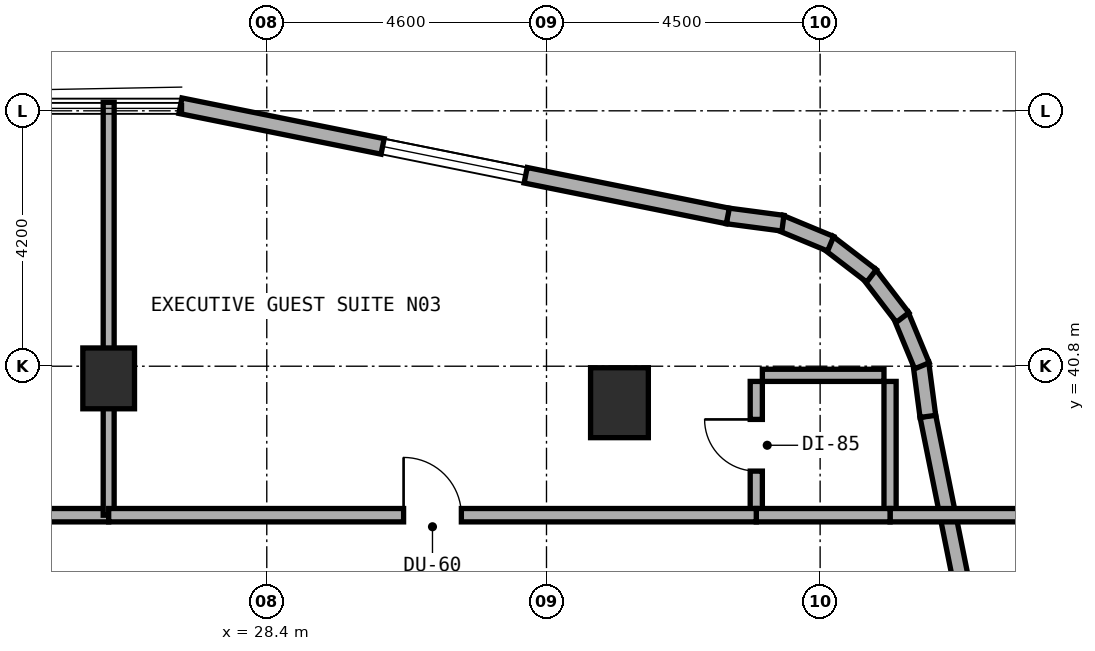
"""IFC4 building model, lengths in metres.
Left out: names, types, materials, properties, quantities, classifications, styles, units other than length and angle.
Written with IfcOpenShell. Run it as: python <this file> out.ifc"""

import sys

from ifc_helpers import new_model, si_unit, direction, frame, frame_2d, origin, origin_2d, place, context, subcontext, project, spatial, rectangle, extrude, element, fill, save


model = new_model("IFC4")
c1 = context("Model", 3, precision=1e-05, world=origin(), true_north=direction((0.0, 1.0)))
c2 = subcontext(c1, "Body", "Model", "MODEL_VIEW")
j1 = project(units=[si_unit("LENGTHUNIT", "METRE"), si_unit("PLANEANGLEUNIT", "RADIAN")], contexts=[c1])
p1 = place(None, origin())
s1 = spatial("IfcSite", under=j1, at=p1, CompositionType="ELEMENT")
p2 = place(p1, origin())
s2 = spatial("IfcBuilding", under=s1, at=p2, CompositionType="ELEMENT")
p3 = place(p2, frame((0.0, 0.0, 109.0)))
s3 = spatial("IfcBuildingStorey", under=s2, at=p3, CompositionType="ELEMENT", Elevation=109.0)
p4 = place(p3, frame((25.8, 40.6, 0.0), z_axis=(0.0, 0.0, 1.0), x_axis=(1.0, 0.0, 0.0)))
e1 = element("IfcColumn", 1, at=p4, inside=s3, PredefinedType="COLUMN", context=c2, shape_type="SweptSolid", body=[
    extrude(rectangle(XDim=0.85, YDim=1.0, at=origin_2d()), origin(), (0.0, 0.0, 1.0), 3.5),
])
p5 = place(p3, frame((34.2, 40.2, 0.0), z_axis=(0.0, 0.0, 1.0), x_axis=(1.0, 0.0, 0.0)))
e2 = element("IfcColumn", 2, at=p5, inside=s3, PredefinedType="COLUMN", context=c2, shape_type="SweptSolid", body=[
    extrude(rectangle(XDim=0.95, YDim=1.15, at=origin_2d()), origin(), (0.0, 0.0, 1.0), 3.5),
])
p6 = place(p3, frame((41.084, 30.98, 0.0), z_axis=(0.0, 0.0, 1.0), x_axis=(-0.197435082048, 0.980315963543, 0.0)))
e3 = element("IfcWall", 3, at=p6, inside=s3, PredefinedType="STANDARD", context=c2, shape_type="SweptSolid", body=[
    extrude(rectangle(XDim=9.183, YDim=0.26, at=frame_2d((4.591, 0.0))), origin(), (0.0, 0.0, 1.0), 3.22),
])
p7 = place(p6, frame((2.497, 0.0, 0.8)))
e4 = element("IfcOpeningElement", 4, at=p7, cuts=e3, PredefinedType="OPENING", context=c2, shape_type="SweptSolid", body=[
    extrude(rectangle(XDim=2.4, YDim=1.6, at=frame_2d((1.2, 0.8))), frame((0.0, 0.14, 0.0), z_axis=(0.0, -1.0, 0.0), x_axis=(1.0, 0.0, 0.0)), (0.0, 0.0, 1.0), 0.28),
])
p8 = place(p3, frame((39.272, 39.975, 0.0), z_axis=(0.0, 0.0, 1.0), x_axis=(-0.130953706898, 0.991388484223, 0.0)))
e5 = element("IfcWall", 5, at=p8, inside=s3, PredefinedType="STANDARD", context=c2, shape_type="SweptSolid", body=[
    extrude(rectangle(XDim=0.885, YDim=0.26, at=frame_2d((0.443, 0.0))), origin(), (0.0, 0.0, 1.0), 3.22),
])
p9 = place(p3, frame((39.174, 40.807, 0.0), z_axis=(0.0, 0.0, 1.0), x_axis=(-0.383290660547, 0.923627776508, 0.0)))
e6 = element("IfcWall", 6, at=p9, inside=s3, PredefinedType="STANDARD", context=c2, shape_type="SweptSolid", body=[
    extrude(rectangle(XDim=0.903, YDim=0.26, at=frame_2d((0.452, 0.0))), origin(), (0.0, 0.0, 1.0), 3.22),
])
p10 = place(p3, frame((38.856, 41.601, 0.0), z_axis=(0.0, 0.0, 1.0), x_axis=(-0.608624690463, 0.793458244748, 0.0)))
e7 = element("IfcWall", 7, at=p10, inside=s3, PredefinedType="STANDARD", context=c2, shape_type="SweptSolid", body=[
    extrude(rectangle(XDim=0.902, YDim=0.26, at=frame_2d((0.451, 0.0))), origin(), (0.0, 0.0, 1.0), 3.22),
])
p11 = place(p3, frame((38.345, 42.286, 0.0), z_axis=(0.0, 0.0, 1.0), x_axis=(-0.793558456666, 0.608494022858, 0.0)))
e8 = element("IfcWall", 8, at=p11, inside=s3, PredefinedType="STANDARD", context=c2, shape_type="SweptSolid", body=[
    extrude(rectangle(XDim=0.902, YDim=0.26, at=frame_2d((0.451, 0.0))), origin(), (0.0, 0.0, 1.0), 3.22),
])
p12 = place(p3, frame((37.673, 42.814, 0.0), z_axis=(0.0, 0.0, 1.0), x_axis=(-0.923683767999, 0.383155708213, 0.0)))
e9 = element("IfcWall", 9, at=p12, inside=s3, PredefinedType="STANDARD", context=c2, shape_type="SweptSolid", body=[
    extrude(rectangle(XDim=0.903, YDim=0.26, at=frame_2d((0.451, 0.0))), origin(), (0.0, 0.0, 1.0), 3.22),
])
p13 = place(p3, frame((36.888, 43.152, 0.0), z_axis=(0.0, 0.0, 1.0), x_axis=(-0.991487658083, 0.130200706103, 0.0)))
e10 = element("IfcWall", 10, at=p13, inside=s3, PredefinedType="STANDARD", context=c2, shape_type="SweptSolid", body=[
    extrude(rectangle(XDim=0.921, YDim=0.26, at=frame_2d((0.46, 0.0))), origin(), (0.0, 0.0, 1.0), 3.22),
])
p14 = place(p3, frame((35.982, 43.271, 0.0), z_axis=(0.0, 0.0, 1.0), x_axis=(-0.980315963543, 0.197435082048, 0.0)))
e11 = element("IfcWall", 11, at=p14, inside=s3, PredefinedType="STANDARD", context=c2, shape_type="SweptSolid", body=[
    extrude(rectangle(XDim=9.183, YDim=0.26, at=frame_2d((4.591, 0.0))), origin(), (0.0, 0.0, 1.0), 3.22),
])
p15 = place(p14, frame((3.391, 0.0, 0.8)))
e12 = element("IfcOpeningElement", 12, at=p15, cuts=e11, PredefinedType="OPENING", context=c2, shape_type="SweptSolid", body=[
    extrude(rectangle(XDim=2.4, YDim=1.6, at=frame_2d((1.2, 0.8))), frame((0.0, 0.14, 0.0), z_axis=(0.0, -1.0, 0.0), x_axis=(1.0, 0.0, 0.0)), (0.0, 0.0, 1.0), 0.28),
])
p16 = place(p3, frame((18.4, 38.35, 0.0), z_axis=(0.0, 0.0, 1.0), x_axis=(1.0, 0.0, 0.0)))
e13 = element("IfcWall", 13, at=p16, inside=s3, PredefinedType="SOLIDWALL", context=c2, shape_type="SweptSolid", body=[
    extrude(rectangle(XDim=7.4, YDim=0.22, at=frame_2d((3.7, 0.0))), origin(), (0.0, 0.0, 1.0), 2.595),
])
p17 = place(p16, frame((3.225, 0.0, 0.0)))
e14 = element("IfcOpeningElement", 14, at=p17, cuts=e13, PredefinedType="OPENING", context=c2, shape_type="SweptSolid", body=[
    extrude(rectangle(XDim=0.95, YDim=2.1, at=frame_2d((0.475, 1.05))), frame((0.0, 0.12, 0.0), z_axis=(0.0, -1.0, 0.0), x_axis=(1.0, 0.0, 0.0)), (0.0, 0.0, 1.0), 0.24),
])
p18 = place(p3, frame((25.8, 38.35, 0.0), z_axis=(0.0, 0.0, 1.0), x_axis=(0.0, 1.0, 0.0)))
e15 = element("IfcWall", 15, at=p18, inside=s3, PredefinedType="SOLIDWALL", context=c2, shape_type="SweptSolid", body=[
    extrude(rectangle(XDim=6.79, YDim=0.18, at=frame_2d((3.395, 0.0))), origin(), (0.0, 0.0, 1.0), 2.595),
])
p19 = place(p3, frame((36.45, 38.45, 0.0), z_axis=(0.0, 0.0, 1.0), x_axis=(0.0, 1.0, 0.0)))
e16 = element("IfcWall", 16, at=p19, inside=s3, PredefinedType="PLUMBINGWALL", context=c2, shape_type="SweptSolid", body=[
    extrude(rectangle(XDim=2.1, YDim=0.2, at=frame_2d((1.05, 0.0))), origin(), (0.0, 0.0, 1.0), 3.22),
])
p20 = place(p19, frame((0.625, 0.0, 0.0)))
e17 = element("IfcOpeningElement", 17, at=p20, cuts=e16, PredefinedType="OPENING", context=c2, shape_type="SweptSolid", body=[
    extrude(rectangle(XDim=0.85, YDim=2.1, at=frame_2d((0.425, 1.05))), frame((0.0, 0.11, 0.0), z_axis=(0.0, -1.0, 0.0), x_axis=(1.0, 0.0, 0.0)), (0.0, 0.0, 1.0), 0.22),
])
p21 = place(p3, frame((36.55, 40.65, 0.0), z_axis=(0.0, 0.0, 1.0), x_axis=(1.0, 0.0, 0.0)))
e18 = element("IfcWall", 18, at=p21, inside=s3, PredefinedType="PLUMBINGWALL", context=c2, shape_type="SweptSolid", body=[
    extrude(rectangle(XDim=2.0, YDim=0.2, at=frame_2d((1.0, 0.0))), origin(), (0.0, 0.0, 1.0), 3.22),
])
p22 = place(p3, frame((38.65, 38.45, 0.0), z_axis=(0.0, 0.0, 1.0), x_axis=(0.0, 1.0, 0.0)))
e19 = element("IfcWall", 19, at=p22, inside=s3, PredefinedType="PLUMBINGWALL", context=c2, shape_type="SweptSolid", body=[
    extrude(rectangle(XDim=2.1, YDim=0.2, at=frame_2d((1.05, 0.0))), origin(), (0.0, 0.0, 1.0), 3.22),
])
p23 = place(p3, frame((38.65, 38.35, 0.0), z_axis=(0.0, 0.0, 1.0), x_axis=(1.0, 0.0, 0.0)))
e20 = element("IfcWall", 20, at=p23, inside=s3, PredefinedType="SOLIDWALL", context=c2, shape_type="SweptSolid", body=[
    extrude(rectangle(XDim=2.39, YDim=0.22, at=frame_2d((1.195, 0.0))), origin(), (0.0, 0.0, 1.0), 3.22),
])
p24 = place(p3, frame((36.45, 38.35, 0.0), z_axis=(0.0, 0.0, 1.0), x_axis=(1.0, 0.0, 0.0)))
e21 = element("IfcWall", 21, at=p24, inside=s3, PredefinedType="SOLIDWALL", context=c2, shape_type="SweptSolid", body=[
    extrude(rectangle(XDim=2.2, YDim=0.22, at=frame_2d((1.1, 0.0))), origin(), (0.0, 0.0, 1.0), 3.22),
])
p25 = place(p3, frame((25.8, 38.35, 0.0), z_axis=(0.0, 0.0, 1.0), x_axis=(1.0, 0.0, 0.0)))
e22 = element("IfcWall", 22, at=p25, inside=s3, PredefinedType="SOLIDWALL", context=c2, shape_type="SweptSolid", body=[
    extrude(rectangle(XDim=10.65, YDim=0.22, at=frame_2d((5.325, 0.0))), origin(), (0.0, 0.0, 1.0), 2.595),
])
p26 = place(p25, frame((4.85, 0.0, 0.0)))
e23 = element("IfcOpeningElement", 23, at=p26, cuts=e22, PredefinedType="OPENING", context=c2, shape_type="SweptSolid", body=[
    extrude(rectangle(XDim=0.95, YDim=2.1, at=frame_2d((0.475, 1.05))), frame((0.0, 0.12, 0.0), z_axis=(0.0, -1.0, 0.0), x_axis=(1.0, 0.0, 0.0)), (0.0, 0.0, 1.0), 0.24),
])
p27 = place(p15, origin())
e24 = element("IfcWindow", 24, at=p27, inside=s3, PartitioningType="SINGLE_PANEL", PredefinedType="WINDOW", context=c2, shape_type="SweptSolid", body=[
    extrude(rectangle(XDim=2.4, YDim=1.6, at=frame_2d((1.2, 0.8))), frame((0.0, 0.03, 0.0), z_axis=(0.0, -1.0, 0.0), x_axis=(1.0, 0.0, 0.0)), (0.0, 0.0, 1.0), 0.06),
])
fill(e12, e24)
p28 = place(p20, origin())
e25 = element("IfcDoor", 25, at=p28, inside=s3, OperationType="SINGLE_SWING_RIGHT", PredefinedType="DOOR", context=c2, shape_type="SweptSolid", body=[
    extrude(rectangle(XDim=0.85, YDim=2.1, at=frame_2d((0.425, 1.05))), frame((0.0, 0.025, 0.0), z_axis=(0.0, -1.0, 0.0), x_axis=(1.0, 0.0, 0.0)), (0.0, 0.0, 1.0), 0.05),
])
fill(e17, e25)
p29 = place(p26, origin())
e26 = element("IfcDoor", 26, at=p29, inside=s3, OperationType="SINGLE_SWING_LEFT", PredefinedType="DOOR", context=c2, shape_type="SweptSolid", body=[
    extrude(rectangle(XDim=0.95, YDim=2.1, at=frame_2d((0.475, 1.05))), frame((0.0, 0.025, 0.0), z_axis=(0.0, -1.0, 0.0), x_axis=(1.0, 0.0, 0.0)), (0.0, 0.0, 1.0), 0.05),
])
fill(e23, e26)
save(model, sys.argv[1])
